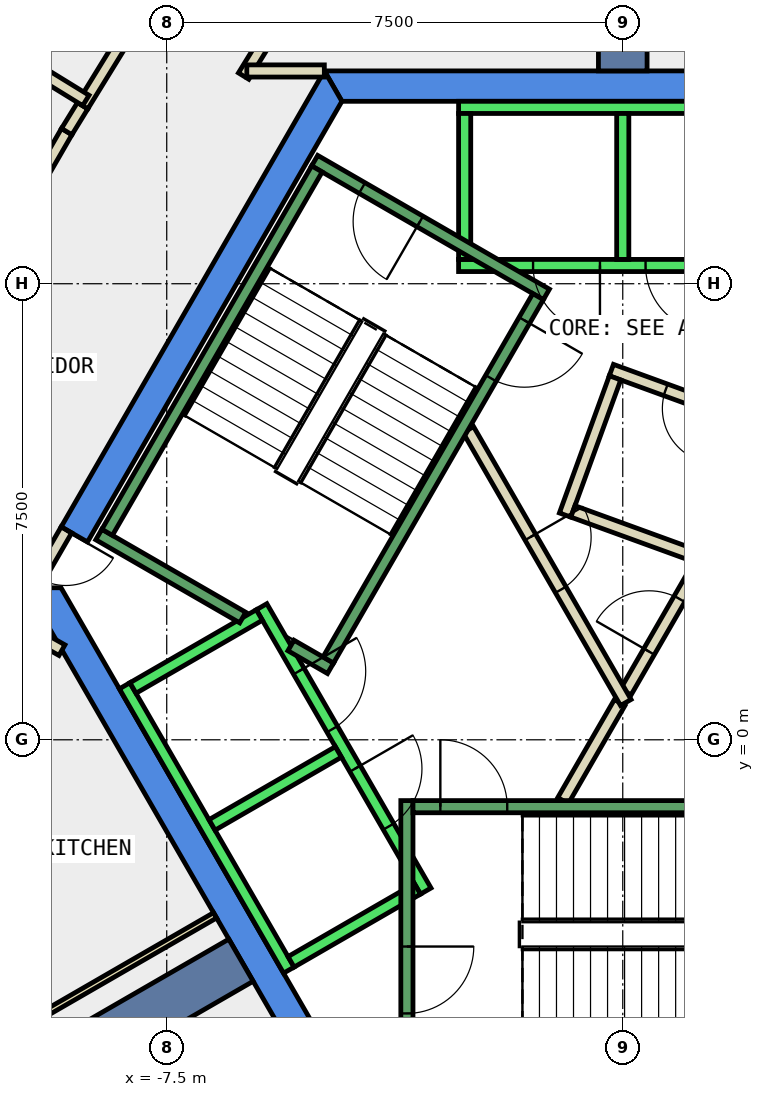
"""IFC4 building model, lengths in metres.
Left out: names, types, materials, properties, quantities, classifications, styles, units other than length and angle.
Written with IfcOpenShell. Run it as: python <this file> out.ifc"""

import sys

from ifc_helpers import new_model, si_unit, direction, frame, frame_2d, origin, place, context, subcontext, project, spatial, polyline, rectangle, outline, extrude, element, fill, save


model = new_model("IFC4")
c1 = context("Model", 3, precision=1e-05, world=origin(), true_north=direction((0.0, 1.0)))
c2 = subcontext(c1, "Body", "Model", "MODEL_VIEW")
j1 = project(units=[si_unit("LENGTHUNIT", "METRE"), si_unit("PLANEANGLEUNIT", "RADIAN")], contexts=[c1])
p1 = place(None, origin())
s1 = spatial("IfcSite", under=j1, at=p1, CompositionType="ELEMENT")
p2 = place(p1, origin())
s2 = spatial("IfcBuilding", under=s1, at=p2, CompositionType="ELEMENT")
p3 = place(p2, frame((0.0, 0.0, 318.8)))
s3 = spatial("IfcBuildingStorey", under=s2, at=p3, CompositionType="ELEMENT", Elevation=318.8)
p4 = place(p3, frame((0.0, 0.0, -0.34)))
e1 = element("IfcWall", 1, at=p4, inside=s3, PredefinedType="SHEAR", context=c2, shape_type="SweptSolid", body=[
    extrude(outline(polyline([(4.907, 11.0), (-4.907, 11.0), (-4.619, 10.5), (4.619, 10.5), (4.907, 11.0)])), origin(), (0.0, 0.0, 1.0), 3.6),
])
p5 = place(p3, frame((0.0, 0.0, -0.34)))
e2 = element("IfcWall", 2, at=p5, inside=s3, PredefinedType="SHEAR", context=c2, shape_type="SweptSolid", body=[
    extrude(outline(polyline([(-9.236, 3.502), (-8.803, 3.253), (-4.619, 10.5), (-4.907, 11.0), (-9.236, 3.502)])), origin(), (0.0, 0.0, 1.0), 3.6),
])
p6 = place(p3, frame((0.0, 0.0, -0.34)))
e3 = element("IfcWall", 3, at=p6, inside=s3, PredefinedType="SHEAR", context=c2, shape_type="SweptSolid", body=[
    extrude(outline(polyline([(-9.815, 2.5), (-4.907, -6.0), (-4.619, -5.5), (-9.238, 2.5), (-9.815, 2.5)])), origin(), (0.0, 0.0, 1.0), 3.6),
])
p7 = place(p3, frame((0.0, 11.0, -0.34), z_axis=(0.0, 0.0, 1.0), x_axis=(0.0, 1.0, 0.0)))
e4 = element("IfcWall", 4, at=p7, inside=s3, PredefinedType="SHEAR", context=c2, shape_type="SweptSolid", body=[
    extrude(rectangle(XDim=9.0, YDim=0.8, at=frame_2d((4.5, 0.0))), origin(), (0.0, 0.0, 1.0), 3.6),
])
p8 = place(p3, frame((-6.279, -3.625, -0.34), z_axis=(0.0, 0.0, 1.0), x_axis=(-0.866017533419, -0.500013631625, 0.0)))
e5 = element("IfcWall", 5, at=p8, inside=s3, PredefinedType="SHEAR", context=c2, shape_type="SweptSolid", body=[
    extrude(rectangle(XDim=9.0, YDim=0.8, at=frame_2d((4.5, 0.0))), origin(), (0.0, 0.0, 1.0), 3.6),
])
p9 = place(p3, frame((2.444, 5.122, 0.0), z_axis=(0.0, 0.0, 1.0), x_axis=(-0.939650782256, 0.342135071873, 0.0)))
e6 = element("IfcWall", 6, at=p9, inside=s3, PredefinedType="PARTITIONING", context=c2, shape_type="SweptSolid", body=[
    extrude(rectangle(XDim=2.8, YDim=0.2, at=frame_2d((1.4, 0.0))), origin(), (0.0, 0.0, 1.0), 3.26),
])
p10 = place(p9, frame((0.95, 0.0, 0.0)))
e7 = element("IfcOpeningElement", 7, at=p10, cuts=e6, PredefinedType="OPENING", context=c2, shape_type="SweptSolid", body=[
    extrude(rectangle(XDim=0.9, YDim=2.1, at=frame_2d((0.45, 1.05))), frame((0.0, 0.11, 0.0), z_axis=(0.0, -1.0, 0.0), x_axis=(1.0, 0.0, 0.0)), (0.0, 0.0, 1.0), 0.22),
])
p11 = place(p3, frame((-0.127, 5.952, 0.0), z_axis=(0.0, 0.0, 1.0), x_axis=(-0.342012513308, -0.93969539785, 0.0)))
e8 = element("IfcWall", 8, at=p11, inside=s3, PredefinedType="PARTITIONING", context=c2, shape_type="SweptSolid", body=[
    extrude(rectangle(XDim=2.401, YDim=0.2, at=frame_2d((1.2, 0.0))), origin(), (0.0, 0.0, 1.0), 3.26),
])
p12 = place(p3, frame((-0.82, 3.756, 0.0), z_axis=(0.0, 0.0, 1.0), x_axis=(0.939740098492, -0.34188967122, 0.0)))
e9 = element("IfcWall", 9, at=p12, inside=s3, PredefinedType="PARTITIONING", context=c2, shape_type="SweptSolid", body=[
    extrude(rectangle(XDim=2.273, YDim=0.2, at=frame_2d((1.136, 0.0))), origin(), (0.0, 0.0, 1.0), 3.26),
])
p13 = place(p3, frame((-3.301, 15.684, 0.0), z_axis=(0.0, 0.0, 1.0), x_axis=(-0.524004979532, -0.851715199715, 0.0)))
e10 = element("IfcWall", 10, at=p13, inside=s3, PredefinedType="PARTITIONING", context=c2, shape_type="SweptSolid", body=[
    extrude(rectangle(XDim=5.599, YDim=0.2, at=frame_2d((2.8, 0.0))), origin(), (0.0, 0.0, 1.0), 3.26),
])
p14 = place(p13, frame((2.3, 0.0, 0.0)))
e11 = element("IfcOpeningElement", 11, at=p14, cuts=e10, PredefinedType="OPENING", context=c2, shape_type="SweptSolid", body=[
    extrude(rectangle(XDim=1.0, YDim=2.1, at=frame_2d((0.5, 1.05))), frame((0.0, 0.11, 0.0), z_axis=(0.0, -1.0, 0.0), x_axis=(1.0, 0.0, 0.0)), (0.0, 0.0, 1.0), 0.22),
])
p15 = place(p3, frame((-6.183, 10.999, 0.0), z_axis=(0.0, 0.0, 1.0), x_axis=(1.0, 0.0, 0.0)))
e12 = element("IfcWall", 12, at=p15, inside=s3, PredefinedType="PARTITIONING", context=c2, shape_type="SweptSolid", body=[
    extrude(rectangle(XDim=1.275, YDim=0.2, at=frame_2d((0.638, 0.0))), origin(), (0.0, 0.0, 1.0), 3.26),
])
p16 = place(p3, frame((-9.223, 1.474, 0.0), z_axis=(0.0, 0.0, 1.0), x_axis=(-0.871623785844, 0.490175454251, 0.0)))
e13 = element("IfcWall", 13, at=p16, inside=s3, PredefinedType="PARTITIONING", context=c2, shape_type="SweptSolid", body=[
    extrude(rectangle(XDim=2.297, YDim=0.2, at=frame_2d((1.148, 0.0))), origin(), (0.0, 0.0, 1.0), 3.26),
])
p17 = place(p3, frame((-11.153, 6.525, 0.0), z_axis=(0.0, 0.0, 1.0), x_axis=(0.500108414701, 0.865962801479, 0.0)))
e14 = element("IfcWall", 14, at=p17, inside=s3, PredefinedType="PARTITIONING", context=c2, shape_type="SweptSolid", body=[
    extrude(rectangle(XDim=4.015, YDim=0.2, at=frame_2d((2.008, 0.0))), origin(), (0.0, 0.0, 1.0), 3.26),
])
p18 = place(p3, frame((-9.145, 10.002, 0.0), z_axis=(0.0, 0.0, 1.0), x_axis=(0.523797791684, 0.851842634192, 0.0)))
e15 = element("IfcWall", 15, at=p18, inside=s3, PredefinedType="PARTITIONING", context=c2, shape_type="SweptSolid", body=[
    extrude(rectangle(XDim=0.5, YDim=0.2, at=frame_2d((0.25, 0.0))), origin(), (0.0, 0.0, 1.0), 3.26),
])
p19 = place(p3, frame((-8.883, 10.428, 0.0), z_axis=(0.0, 0.0, 1.0), x_axis=(0.524061371587, 0.851680502777, 0.0)))
e16 = element("IfcWall", 16, at=p19, inside=s3, PredefinedType="PARTITIONING", context=c2, shape_type="SweptSolid", body=[
    extrude(rectangle(XDim=3.4, YDim=0.2, at=frame_2d((1.7, 0.0))), origin(), (0.0, 0.0, 1.0), 3.26),
])
p20 = place(p3, frame((-0.982, -1.0, 0.0), z_axis=(0.0, 0.0, 1.0), x_axis=(0.50024047865, 0.865886518847, 0.0)))
e17 = element("IfcWall", 17, at=p20, inside=s3, PredefinedType="PARTITIONING", context=c2, shape_type="SweptSolid", body=[
    extrude(rectangle(XDim=1.863, YDim=0.2, at=frame_2d((0.931, 0.0))), origin(), (0.0, 0.0, 1.0), 3.26),
])
p21 = place(p3, frame((0.05, 0.787, 0.0), z_axis=(0.0, 0.0, 1.0), x_axis=(0.500070457302, 0.865984721421, 0.0)))
e18 = element("IfcWall", 18, at=p21, inside=s3, PredefinedType="PARTITIONING", context=c2, shape_type="SweptSolid", body=[
    extrude(rectangle(XDim=2.631, YDim=0.2, at=frame_2d((1.316, 0.0))), origin(), (0.0, 0.0, 1.0), 3.26),
])
p22 = place(p21, frame((0.766, 0.0, 0.0)))
e19 = element("IfcOpeningElement", 19, at=p22, cuts=e18, PredefinedType="OPENING", context=c2, shape_type="SweptSolid", body=[
    extrude(rectangle(XDim=1.0, YDim=2.1, at=frame_2d((0.5, 1.05))), frame((0.0, 0.11, 0.0), z_axis=(0.0, -1.0, 0.0), x_axis=(1.0, 0.0, 0.0)), (0.0, 0.0, 1.0), 0.22),
])
p23 = place(p3, frame((-2.54, 5.1, 0.0), z_axis=(0.0, 0.0, 1.0), x_axis=(0.499925051871, -0.866068670783, 0.0)))
e20 = element("IfcWall", 20, at=p23, inside=s3, PredefinedType="PARTITIONING", context=c2, shape_type="SweptSolid", body=[
    extrude(rectangle(XDim=5.181, YDim=0.2, at=frame_2d((2.59, 0.0))), origin(), (0.0, 0.0, 1.0), 3.26),
])
p24 = place(p23, frame((2.04, 0.0, 0.0)))
e21 = element("IfcOpeningElement", 21, at=p24, cuts=e20, PredefinedType="OPENING", context=c2, shape_type="SweptSolid", body=[
    extrude(rectangle(XDim=1.0, YDim=2.1, at=frame_2d((0.5, 1.05))), frame((0.0, 0.11, 0.0), z_axis=(0.0, -1.0, 0.0), x_axis=(1.0, 0.0, 0.0)), (0.0, 0.0, 1.0), 0.22),
])
p25 = place(p3, frame((-6.705, -2.887, 0.0), z_axis=(0.0, 0.0, 1.0), x_axis=(-0.866001397039, -0.500041578597, 0.0)))
e22 = element("IfcWall", 22, at=p25, inside=s3, PredefinedType="PARTITIONING", context=c2, shape_type="SweptSolid", body=[
    extrude(rectangle(XDim=6.998, YDim=0.1, at=frame_2d((3.499, 0.0))), origin(), (0.0, 0.0, 1.0), 3.26),
])
p26 = place(p3, frame((-11.13, 11.928, 0.0), z_axis=(0.0, 0.0, 1.0), x_axis=(0.851856970107, -0.523774476737, 0.0)))
e23 = element("IfcWall", 23, at=p26, inside=s3, PredefinedType="PARTITIONING", context=c2, shape_type="SweptSolid", body=[
    extrude(rectangle(XDim=2.7, YDim=0.2, at=frame_2d((1.35, 0.0))), origin(), (0.0, 0.0, 1.0), 3.26),
])
p27 = place(p3, frame((-9.15, 3.452, 0.0), z_axis=(0.0, 0.0, 1.0), x_axis=(-0.500079945886, -0.865979242085, 0.0)))
e24 = element("IfcWall", 24, at=p27, inside=s3, PredefinedType="PARTITIONING", context=c2, shape_type="SweptSolid", body=[
    extrude(rectangle(XDim=0.926, YDim=0.2, at=frame_2d((0.463, 0.0))), origin(), (0.0, 0.0, 1.0), 2.4),
])
p28 = place(p27, frame((0.017, 0.0, 0.0)))
e25 = element("IfcOpeningElement", 25, at=p28, cuts=e24, PredefinedType="OPENING", context=c2, shape_type="SweptSolid", body=[
    extrude(rectangle(XDim=0.9, YDim=2.1, at=frame_2d((0.45, 1.05))), frame((0.0, 0.11, 0.0), z_axis=(0.0, -1.0, 0.0), x_axis=(1.0, 0.0, 0.0)), (0.0, 0.0, 1.0), 0.22),
])
p29 = place(p3, frame((2.7, 7.8, 0.0), z_axis=(0.0, 0.0, 1.0), x_axis=(-1.0, 0.0, 0.0)))
e26 = element("IfcWall", 26, at=p29, inside=s3, PredefinedType="STANDARD", context=c2, shape_type="SweptSolid", body=[
    extrude(rectangle(XDim=5.4, YDim=0.2, at=frame_2d((2.7, 0.0))), origin(), (0.0, 0.0, 1.0), 3.26),
])
p30 = place(p29, frame((1.225, 0.0, 0.0)))
e27 = element("IfcOpeningElement", 27, at=p30, cuts=e26, PredefinedType="OPENING", context=c2, shape_type="SweptSolid", body=[
    extrude(rectangle(XDim=1.1, YDim=2.1, at=frame_2d((0.55, 1.05))), frame((0.0, 0.11, 0.0), z_axis=(0.0, -1.0, 0.0), x_axis=(1.0, 0.0, 0.0)), (0.0, 0.0, 1.0), 0.22),
])
p31 = place(p29, frame((3.075, 0.0, 0.0)))
e28 = element("IfcOpeningElement", 28, at=p31, cuts=e26, PredefinedType="OPENING", context=c2, shape_type="SweptSolid", body=[
    extrude(rectangle(XDim=1.1, YDim=2.1, at=frame_2d((0.55, 1.05))), frame((0.0, 0.11, 0.0), z_axis=(0.0, -1.0, 0.0), x_axis=(1.0, 0.0, 0.0)), (0.0, 0.0, 1.0), 0.22),
])
p32 = place(p3, frame((2.7, 10.4, 0.0), z_axis=(0.0, 0.0, 1.0), x_axis=(-1.0, 0.0, 0.0)))
e29 = element("IfcWall", 29, at=p32, inside=s3, PredefinedType="STANDARD", context=c2, shape_type="SweptSolid", body=[
    extrude(rectangle(XDim=5.4, YDim=0.2, at=frame_2d((2.7, 0.0))), origin(), (0.0, 0.0, 1.0), 3.26),
])
for number, where, z_axis, x_axis in (
    (30, (0.0, 7.9, 0.0), (0.0, 0.0, 1.0), (0.0, 1.0, 0.0)),
    (31, (-2.6, 7.9, 0.0), (0.0, 0.0, 1.0), (0.0, 1.0, 0.0)),
):
    element("IfcWall", number, at=place(p3, frame(where, z_axis=z_axis, x_axis=x_axis)), inside=s3, PredefinedType="STANDARD", context=c2, shape_type="SweptSolid", body=[
        extrude(rectangle(XDim=2.4, YDim=0.2, at=frame_2d((1.2, 0.0))), origin(), (0.0, 0.0, 1.0), 3.26),
    ])
p33 = place(p3, frame((-5.94, 2.188, 0.0), z_axis=(0.0, 0.0, 1.0), x_axis=(0.500034260056, -0.866005622828, 0.0)))
e32 = element("IfcWall", 32, at=p33, inside=s3, PredefinedType="STANDARD", context=c2, shape_type="SweptSolid", body=[
    extrude(rectangle(XDim=5.399, YDim=0.2, at=frame_2d((2.7, 0.0))), origin(), (0.0, 0.0, 1.0), 3.26),
])
p34 = place(p33, frame((3.075, 0.0, 0.0)))
e33 = element("IfcOpeningElement", 33, at=p34, cuts=e32, PredefinedType="OPENING", context=c2, shape_type="SweptSolid", body=[
    extrude(rectangle(XDim=1.1, YDim=2.1, at=frame_2d((0.55, 1.05))), frame((0.0, 0.11, 0.0), z_axis=(0.0, -1.0, 0.0), x_axis=(1.0, 0.0, 0.0)), (0.0, 0.0, 1.0), 0.22),
])
p35 = place(p33, frame((1.225, 0.0, 0.0)))
e34 = element("IfcOpeningElement", 34, at=p35, cuts=e32, PredefinedType="OPENING", context=c2, shape_type="SweptSolid", body=[
    extrude(rectangle(XDim=1.1, YDim=2.1, at=frame_2d((0.55, 1.05))), frame((0.0, 0.11, 0.0), z_axis=(0.0, -1.0, 0.0), x_axis=(1.0, 0.0, 0.0)), (0.0, 0.0, 1.0), 0.22),
])
p36 = place(p3, frame((-8.192, 0.888, 0.0), z_axis=(0.0, 0.0, 1.0), x_axis=(0.500034260056, -0.866005622828, 0.0)))
e35 = element("IfcWall", 35, at=p36, inside=s3, PredefinedType="STANDARD", context=c2, shape_type="SweptSolid", body=[
    extrude(rectangle(XDim=5.399, YDim=0.2, at=frame_2d((2.7, 0.0))), origin(), (0.0, 0.0, 1.0), 3.26),
])
for number, where, z_axis, x_axis in (
    (36, (-5.977, 2.052, 0.0), (0.0, 0.0, 1.0), (-0.866, -0.5, 0.0)),
    (37, (-4.677, -0.2, 0.0), (0.0, 0.0, 1.0), (-0.866, -0.5, 0.0)),
):
    element("IfcWall", number, at=place(p3, frame(where, z_axis=z_axis, x_axis=x_axis)), inside=s3, PredefinedType="STANDARD", context=c2, shape_type="SweptSolid", body=[
        extrude(rectangle(XDim=2.399, YDim=0.2, at=frame_2d((1.2, 0.0))), origin(), (0.0, 0.0, 1.0), 3.26),
    ])
p37 = place(p3, frame((-3.377, -2.452, 0.0), z_axis=(0.0, 0.0, 1.0), x_axis=(-0.865955154139, -0.50012165622, 0.0)))
e38 = element("IfcWall", 38, at=p37, inside=s3, PredefinedType="STANDARD", context=c2, shape_type="SweptSolid", body=[
    extrude(rectangle(XDim=2.4, YDim=0.2, at=frame_2d((1.2, 0.0))), origin(), (0.0, 0.0, 1.0), 3.26),
])
p38 = place(p3, frame((-3.55, -1.0, 0.0), z_axis=(0.0, 0.0, 1.0), x_axis=(0.0, -1.0, 0.0)))
e39 = element("IfcWall", 39, at=p38, inside=s3, PredefinedType="STANDARD", context=c2, shape_type="SweptSolid", body=[
    extrude(rectangle(XDim=4.4, YDim=0.2, at=frame_2d((2.2, 0.0))), origin(), (0.0, 0.0, 1.0), 3.26),
])
p39 = place(p38, frame((2.4, 0.0, 0.0)))
e40 = element("IfcOpeningElement", 40, at=p39, cuts=e39, PredefinedType="OPENING", context=c2, shape_type="SweptSolid", body=[
    extrude(rectangle(XDim=1.1, YDim=2.2, at=frame_2d((0.55, 1.1))), frame((0.0, 0.11, 0.0), z_axis=(0.0, -1.0, 0.0), x_axis=(1.0, 0.0, 0.0)), (0.0, 0.0, 1.0), 0.22),
])
p40 = place(p3, frame((-3.45, -1.1, 0.0), z_axis=(0.0, 0.0, 1.0), x_axis=(1.0, 0.0, 0.0)))
e41 = element("IfcWall", 41, at=p40, inside=s3, PredefinedType="STANDARD", context=c2, shape_type="SweptSolid", body=[
    extrude(rectangle(XDim=6.9, YDim=0.2, at=frame_2d((3.45, 0.0))), origin(), (0.0, 0.0, 1.0), 3.26),
])
p41 = place(p40, frame((0.45, 0.0, 0.0)))
e42 = element("IfcOpeningElement", 42, at=p41, cuts=e41, PredefinedType="OPENING", context=c2, shape_type="SweptSolid", body=[
    extrude(rectangle(XDim=1.1, YDim=2.2, at=frame_2d((0.55, 1.1))), frame((0.0, 0.11, 0.0), z_axis=(0.0, -1.0, 0.0), x_axis=(1.0, 0.0, 0.0)), (0.0, 0.0, 1.0), 0.22),
])
p42 = place(p3, frame((-1.256, 7.324, 0.0), z_axis=(0.0, 0.0, 1.0), x_axis=(-0.866046073146, 0.499964197906, 0.0)))
e43 = element("IfcWall", 43, at=p42, inside=s3, PredefinedType="STANDARD", context=c2, shape_type="SweptSolid", body=[
    extrude(rectangle(XDim=4.4, YDim=0.2, at=frame_2d((2.2, 0.0))), origin(), (0.0, 0.0, 1.0), 3.26),
])
p43 = place(p42, frame((2.4, 0.0, 0.0)))
e44 = element("IfcOpeningElement", 44, at=p43, cuts=e43, PredefinedType="OPENING", context=c2, shape_type="SweptSolid", body=[
    extrude(rectangle(XDim=1.1, YDim=2.2, at=frame_2d((0.55, 1.1))), frame((0.0, 0.11, 0.0), z_axis=(0.0, -1.0, 0.0), x_axis=(1.0, 0.0, 0.0)), (0.0, 0.0, 1.0), 0.22),
])
p44 = place(p3, frame((-6.25, 2.01, 0.0), z_axis=(0.0, 0.0, 1.0), x_axis=(-0.86611865017, 0.499838457731, 0.0)))
e45 = element("IfcWall", 45, at=p44, inside=s3, PredefinedType="STANDARD", context=c2, shape_type="SweptSolid", body=[
    extrude(rectangle(XDim=2.733, YDim=0.2, at=frame_2d((1.366, 0.0))), origin(), (0.0, 0.0, 1.0), 3.26),
])
p45 = place(p3, frame((-4.806, 1.176, 0.0), z_axis=(0.0, 0.0, 1.0), x_axis=(-0.866558586415, 0.499075361355, 0.0)))
e46 = element("IfcWall", 46, at=p45, inside=s3, PredefinedType="STANDARD", context=c2, shape_type="SweptSolid", body=[
    extrude(rectangle(XDim=0.751, YDim=0.2, at=frame_2d((0.376, 0.0))), origin(), (0.0, 0.0, 1.0), 3.26),
])
p46 = place(p3, frame((-1.393, 7.288, 0.0), z_axis=(0.0, 0.0, 1.0), x_axis=(-0.499963383562, -0.866046543262, 0.0)))
e47 = element("IfcWall", 47, at=p46, inside=s3, PredefinedType="STANDARD", context=c2, shape_type="SweptSolid", body=[
    extrude(rectangle(XDim=6.9, YDim=0.2, at=frame_2d((3.45, 0.0))), origin(), (0.0, 0.0, 1.0), 3.26),
])
p47 = place(p46, frame((0.45, 0.0, 0.0)))
e48 = element("IfcOpeningElement", 48, at=p47, cuts=e47, PredefinedType="OPENING", context=c2, shape_type="SweptSolid", body=[
    extrude(rectangle(XDim=1.1, YDim=2.2, at=frame_2d((0.55, 1.1))), frame((0.0, 0.11, 0.0), z_axis=(0.0, -1.0, 0.0), x_axis=(1.0, 0.0, 0.0)), (0.0, 0.0, 1.0), 0.22),
])
p48 = place(p3, frame((-5.03, 9.388, 0.0), z_axis=(0.0, 0.0, 1.0), x_axis=(-0.499978703459, -0.866037698999, 0.0)))
e49 = element("IfcWall", 49, at=p48, inside=s3, PredefinedType="STANDARD", context=c2, shape_type="SweptSolid", body=[
    extrude(rectangle(XDim=6.9, YDim=0.2, at=frame_2d((3.45, 0.0))), origin(), (0.0, 0.0, 1.0), 3.26),
])
p49 = place(p22, origin())
e50 = element("IfcDoor", 50, at=p49, inside=s3, OperationType="SINGLE_SWING_RIGHT", PredefinedType="DOOR", context=c2, shape_type="SweptSolid", body=[
    extrude(rectangle(XDim=1.0, YDim=2.1, at=frame_2d((0.5, 1.05))), frame((0.0, 0.025, 0.0), z_axis=(0.0, -1.0, 0.0), x_axis=(1.0, 0.0, 0.0)), (0.0, 0.0, 1.0), 0.05),
])
fill(e19, e50)
p50 = place(p24, origin())
e51 = element("IfcDoor", 51, at=p50, inside=s3, OperationType="SINGLE_SWING_RIGHT", PredefinedType="DOOR", context=c2, shape_type="SweptSolid", body=[
    extrude(rectangle(XDim=1.0, YDim=2.1, at=frame_2d((0.5, 1.05))), frame((0.0, 0.025, 0.0), z_axis=(0.0, -1.0, 0.0), x_axis=(1.0, 0.0, 0.0)), (0.0, 0.0, 1.0), 0.05),
])
fill(e21, e51)
p51 = place(p10, origin())
e52 = element("IfcDoor", 52, at=p51, inside=s3, OperationType="SINGLE_SWING_LEFT", PredefinedType="DOOR", context=c2, shape_type="SweptSolid", body=[
    extrude(rectangle(XDim=0.9, YDim=2.1, at=frame_2d((0.45, 1.05))), frame((0.0, 0.025, 0.0), z_axis=(0.0, -1.0, 0.0), x_axis=(1.0, 0.0, 0.0)), (0.0, 0.0, 1.0), 0.05),
])
fill(e7, e52)
p52 = place(p28, origin())
e53 = element("IfcDoor", 53, at=p52, inside=s3, OperationType="SINGLE_SWING_LEFT", PredefinedType="DOOR", context=c2, shape_type="SweptSolid", body=[
    extrude(rectangle(XDim=0.9, YDim=2.1, at=frame_2d((0.45, 1.05))), frame((0.0, 0.025, 0.0), z_axis=(0.0, -1.0, 0.0), x_axis=(1.0, 0.0, 0.0)), (0.0, 0.0, 1.0), 0.05),
])
fill(e25, e53)
p53 = place(p30, origin())
e54 = element("IfcDoor", 54, at=p53, inside=s3, OperationType="SLIDING_TO_LEFT", PredefinedType="DOOR", context=c2, shape_type="SweptSolid", body=[
    extrude(rectangle(XDim=1.1, YDim=2.1, at=frame_2d((0.55, 1.05))), frame((0.0, 0.025, 0.0), z_axis=(0.0, -1.0, 0.0), x_axis=(1.0, 0.0, 0.0)), (0.0, 0.0, 1.0), 0.05),
])
fill(e27, e54)
p54 = place(p31, origin())
e55 = element("IfcDoor", 55, at=p54, inside=s3, OperationType="SLIDING_TO_LEFT", PredefinedType="DOOR", context=c2, shape_type="SweptSolid", body=[
    extrude(rectangle(XDim=1.1, YDim=2.1, at=frame_2d((0.55, 1.05))), frame((0.0, 0.025, 0.0), z_axis=(0.0, -1.0, 0.0), x_axis=(1.0, 0.0, 0.0)), (0.0, 0.0, 1.0), 0.05),
])
fill(e28, e55)
p55 = place(p34, origin())
e56 = element("IfcDoor", 56, at=p55, inside=s3, OperationType="SLIDING_TO_LEFT", PredefinedType="DOOR", context=c2, shape_type="SweptSolid", body=[
    extrude(rectangle(XDim=1.1, YDim=2.1, at=frame_2d((0.55, 1.05))), frame((0.0, 0.025, 0.0), z_axis=(0.0, -1.0, 0.0), x_axis=(1.0, 0.0, 0.0)), (0.0, 0.0, 1.0), 0.05),
])
fill(e33, e56)
p56 = place(p35, origin())
e57 = element("IfcDoor", 57, at=p56, inside=s3, OperationType="SLIDING_TO_LEFT", PredefinedType="DOOR", context=c2, shape_type="SweptSolid", body=[
    extrude(rectangle(XDim=1.1, YDim=2.1, at=frame_2d((0.55, 1.05))), frame((0.0, 0.025, 0.0), z_axis=(0.0, -1.0, 0.0), x_axis=(1.0, 0.0, 0.0)), (0.0, 0.0, 1.0), 0.05),
])
fill(e34, e57)
p57 = place(p41, origin())
e58 = element("IfcDoor", 58, at=p57, inside=s3, OperationType="SINGLE_SWING_LEFT", PredefinedType="DOOR", context=c2, shape_type="SweptSolid", body=[
    extrude(rectangle(XDim=1.1, YDim=2.2, at=frame_2d((0.55, 1.1))), frame((0.0, 0.025, 0.0), z_axis=(0.0, -1.0, 0.0), x_axis=(1.0, 0.0, 0.0)), (0.0, 0.0, 1.0), 0.05),
])
fill(e42, e58)
p58 = place(p39, origin())
e59 = element("IfcDoor", 59, at=p58, inside=s3, OperationType="SINGLE_SWING_LEFT", PredefinedType="DOOR", context=c2, shape_type="SweptSolid", body=[
    extrude(rectangle(XDim=1.1, YDim=2.2, at=frame_2d((0.55, 1.1))), frame((0.0, 0.025, 0.0), z_axis=(0.0, -1.0, 0.0), x_axis=(1.0, 0.0, 0.0)), (0.0, 0.0, 1.0), 0.05),
])
fill(e40, e59)
p59 = place(p47, origin())
e60 = element("IfcDoor", 60, at=p59, inside=s3, OperationType="SINGLE_SWING_LEFT", PredefinedType="DOOR", context=c2, shape_type="SweptSolid", body=[
    extrude(rectangle(XDim=1.1, YDim=2.2, at=frame_2d((0.55, 1.1))), frame((0.0, 0.025, 0.0), z_axis=(0.0, -1.0, 0.0), x_axis=(1.0, 0.0, 0.0)), (0.0, 0.0, 1.0), 0.05),
])
fill(e48, e60)
p60 = place(p43, origin())
e61 = element("IfcDoor", 61, at=p60, inside=s3, OperationType="SINGLE_SWING_LEFT", PredefinedType="DOOR", context=c2, shape_type="SweptSolid", body=[
    extrude(rectangle(XDim=1.1, YDim=2.2, at=frame_2d((0.55, 1.1))), frame((0.0, 0.025, 0.0), z_axis=(0.0, -1.0, 0.0), x_axis=(1.0, 0.0, 0.0)), (0.0, 0.0, 1.0), 0.05),
])
fill(e44, e61)
save(model, sys.argv[1])
